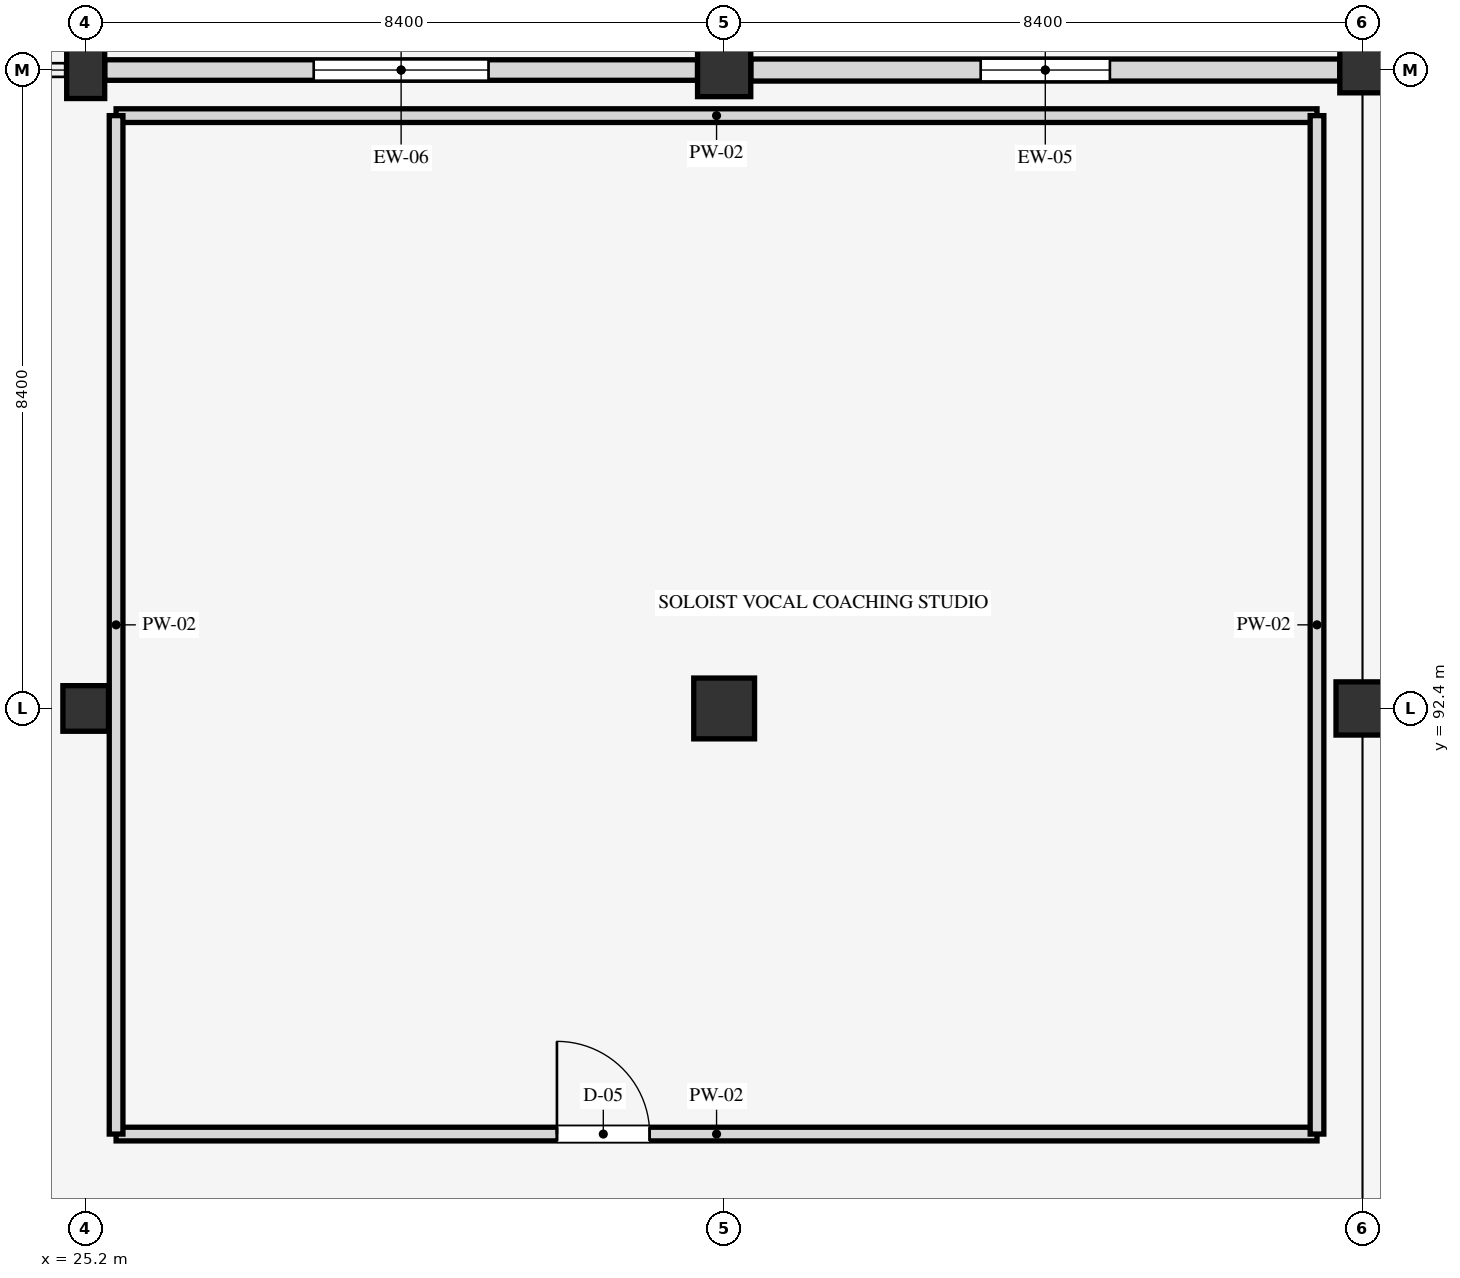
"""IFC4 building model, lengths in metres.
Left out: names, types, materials, properties, quantities, classifications, styles, units other than length and angle.
Written with IfcOpenShell. Run it as: python <this file> out.ifc"""

import sys

from ifc_helpers import new_model, si_unit, direction, frame, frame_2d, origin, origin_2d, place, context, subcontext, project, spatial, rectangle, extrude, element, fill, save


model = new_model("IFC4")
c1 = context("Model", 3, precision=1e-05, world=origin(), true_north=direction((0.0, 1.0)))
c2 = subcontext(c1, "Body", "Model", "MODEL_VIEW")
j1 = project(units=[si_unit("LENGTHUNIT", "METRE"), si_unit("PLANEANGLEUNIT", "RADIAN")], contexts=[c1])
p1 = place(None, origin())
s1 = spatial("IfcSite", under=j1, at=p1, CompositionType="ELEMENT")
p2 = place(p1, origin())
s2 = spatial("IfcBuilding", under=s1, at=p2, CompositionType="ELEMENT")
p3 = place(p2, frame((0.0, 0.0, 9.9)))
s3 = spatial("IfcBuildingStorey", under=s2, at=p3, CompositionType="ELEMENT", Elevation=9.9)
p4 = place(p3, frame((25.2, 92.4, 0.0), z_axis=(0.0, 0.0, 1.0), x_axis=(1.0, 0.0, 0.0)))
e1 = element("IfcColumn", 1, at=p4, inside=s3, PredefinedType="COLUMN", context=c2, shape_type="SweptSolid", body=[
    extrude(rectangle(XDim=0.6, YDim=0.6, at=origin_2d()), origin(), (0.0, 0.0, 1.0), 4.5),
])
p5 = place(p3, frame((25.2, 100.8, 0.0), z_axis=(0.0, 0.0, 1.0), x_axis=(1.0, 0.0, 0.0)))
e2 = element("IfcColumn", 2, at=p5, inside=s3, PredefinedType="PILASTER", context=c2, shape_type="SweptSolid", body=[
    extrude(rectangle(XDim=0.5, YDim=0.75, at=origin_2d()), origin(), (0.0, 0.0, 1.0), 4.5),
])
p6 = place(p3, frame((33.6, 92.4, 0.0), z_axis=(0.0, 0.0, 1.0), x_axis=(1.0, 0.0, 0.0)))
e3 = element("IfcColumn", 3, at=p6, inside=s3, PredefinedType="COLUMN", context=c2, shape_type="SweptSolid", body=[
    extrude(rectangle(XDim=0.8, YDim=0.8, at=origin_2d()), origin(), (0.0, 0.0, 1.0), 4.5),
])
for number, where, z_axis, x_axis in (
    (4, (33.6, 100.8, 0.0), (0.0, 0.0, 1.0), (1.0, 0.0, 0.0)),
    (5, (42.0, 92.4, 0.0), (0.0, 0.0, 1.0), (1.0, 0.0, 0.0)),
):
    element("IfcColumn", number, at=place(p3, frame(where, z_axis=z_axis, x_axis=x_axis)), inside=s3, PredefinedType="COLUMN", context=c2, shape_type="SweptSolid", body=[
        extrude(rectangle(XDim=0.7, YDim=0.7, at=origin_2d()), origin(), (0.0, 0.0, 1.0), 4.5),
    ])
p7 = place(p3, frame((42.0, 100.8, 0.0), z_axis=(0.0, 0.0, 1.0), x_axis=(1.0, 0.0, 0.0)))
e6 = element("IfcColumn", 6, at=p7, inside=s3, PredefinedType="COLUMN", context=c2, shape_type="SweptSolid", body=[
    extrude(rectangle(XDim=0.6, YDim=0.6, at=origin_2d()), origin(), (0.0, 0.0, 1.0), 4.5),
])
p8 = place(p3, frame((41.7, 100.8, 0.0), z_axis=(0.0, 0.0, 1.0), x_axis=(-1.0, 0.0, 0.0)))
e7 = element("IfcWall", 7, at=p8, inside=s3, PredefinedType="STANDARD", context=c2, shape_type="SweptSolid", body=[
    extrude(rectangle(XDim=7.75, YDim=0.29, at=frame_2d((3.875, 0.0))), origin(), (0.0, 0.0, 1.0), 3.68),
])
p9 = place(p8, frame((3.025, 0.0, 0.85)))
e8 = element("IfcOpeningElement", 8, at=p9, cuts=e7, PredefinedType="OPENING", context=c2, shape_type="SweptSolid", body=[
    extrude(rectangle(XDim=1.7, YDim=1.9, at=frame_2d((0.85, 0.95))), frame((0.0, 0.155, 0.0), z_axis=(0.0, -1.0, 0.0), x_axis=(1.0, 0.0, 0.0)), (0.0, 0.0, 1.0), 0.31),
])
p10 = place(p3, frame((33.25, 100.8, 0.0), z_axis=(0.0, 0.0, 1.0), x_axis=(-1.0, 0.0, 0.0)))
e9 = element("IfcWall", 9, at=p10, inside=s3, PredefinedType="STANDARD", context=c2, shape_type="SweptSolid", body=[
    extrude(rectangle(XDim=7.8, YDim=0.27, at=frame_2d((3.9, 0.0))), origin(), (0.0, 0.0, 1.0), 3.68),
])
p11 = place(p10, frame((2.75, 0.0, 0.85)))
e10 = element("IfcOpeningElement", 10, at=p11, cuts=e9, PredefinedType="OPENING", context=c2, shape_type="SweptSolid", body=[
    extrude(rectangle(XDim=2.3, YDim=2.15, at=frame_2d((1.15, 1.075))), frame((0.0, 0.145, 0.0), z_axis=(0.0, -1.0, 0.0), x_axis=(1.0, 0.0, 0.0)), (0.0, 0.0, 1.0), 0.29),
])
p12 = place(p3, frame((25.6, 86.8, 0.0), z_axis=(0.0, 0.0, 1.0), x_axis=(1.0, 0.0, 0.0)))
e11 = element("IfcWall", 11, at=p12, inside=s3, PredefinedType="PARTITIONING", context=c2, shape_type="SweptSolid", body=[
    extrude(rectangle(XDim=15.8, YDim=0.18, at=frame_2d((7.9, 0.0))), origin(), (0.0, 0.0, 1.0), 3.54),
])
p13 = place(p12, frame((5.8, 0.0, 0.0)))
e12 = element("IfcOpeningElement", 12, at=p13, cuts=e11, PredefinedType="OPENING", context=c2, shape_type="SweptSolid", body=[
    extrude(rectangle(XDim=1.22, YDim=2.15, at=frame_2d((0.61, 1.075))), frame((0.0, 0.1, 0.0), z_axis=(0.0, -1.0, 0.0), x_axis=(1.0, 0.0, 0.0)), (0.0, 0.0, 1.0), 0.2),
])
p14 = place(p3, frame((25.6, 100.2, 0.0), z_axis=(0.0, 0.0, 1.0), x_axis=(1.0, 0.0, 0.0)))
e13 = element("IfcWall", 13, at=p14, inside=s3, PredefinedType="PARTITIONING", context=c2, shape_type="SweptSolid", body=[
    extrude(rectangle(XDim=15.8, YDim=0.18, at=frame_2d((7.9, 0.0))), origin(), (0.0, 0.0, 1.0), 3.54),
])
for number, where, z_axis, x_axis in (
    (14, (25.6, 86.8, 0.0), (0.0, 0.0, 1.0), (0.0, 1.0, 0.0)),
    (15, (41.4, 86.8, 0.0), (0.0, 0.0, 1.0), (0.0, 1.0, 0.0)),
):
    element("IfcWall", number, at=place(p3, frame(where, z_axis=z_axis, x_axis=x_axis)), inside=s3, PredefinedType="PARTITIONING", context=c2, shape_type="SweptSolid", body=[
        extrude(rectangle(XDim=13.4, YDim=0.18, at=frame_2d((6.7, 0.0))), origin(), (0.0, 0.0, 1.0), 3.54),
    ])
p15 = place(p9, origin())
e16 = element("IfcWindow", 16, at=p15, inside=s3, PartitioningType="DOUBLE_PANEL_VERTICAL", PredefinedType="WINDOW", context=c2, shape_type="SweptSolid", body=[
    extrude(rectangle(XDim=1.7, YDim=1.9, at=frame_2d((0.85, 0.95))), frame((0.0, 0.03, 0.0), z_axis=(0.0, -1.0, 0.0), x_axis=(1.0, 0.0, 0.0)), (0.0, 0.0, 1.0), 0.06),
])
fill(e8, e16)
p16 = place(p11, origin())
e17 = element("IfcWindow", 17, at=p16, inside=s3, PartitioningType="DOUBLE_PANEL_VERTICAL", PredefinedType="WINDOW", context=c2, shape_type="SweptSolid", body=[
    extrude(rectangle(XDim=2.3, YDim=2.15, at=frame_2d((1.15, 1.075))), frame((0.0, 0.03, 0.0), z_axis=(0.0, -1.0, 0.0), x_axis=(1.0, 0.0, 0.0)), (0.0, 0.0, 1.0), 0.06),
])
fill(e10, e17)
p17 = place(p13, origin())
e18 = element("IfcDoor", 18, at=p17, inside=s3, OperationType="SINGLE_SWING_LEFT", PredefinedType="DOOR", context=c2, shape_type="SweptSolid", body=[
    extrude(rectangle(XDim=1.22, YDim=2.15, at=frame_2d((0.61, 1.075))), frame((0.0, 0.025, 0.0), z_axis=(0.0, -1.0, 0.0), x_axis=(1.0, 0.0, 0.0)), (0.0, 0.0, 1.0), 0.05),
])
fill(e12, e18)
save(model, sys.argv[1])
